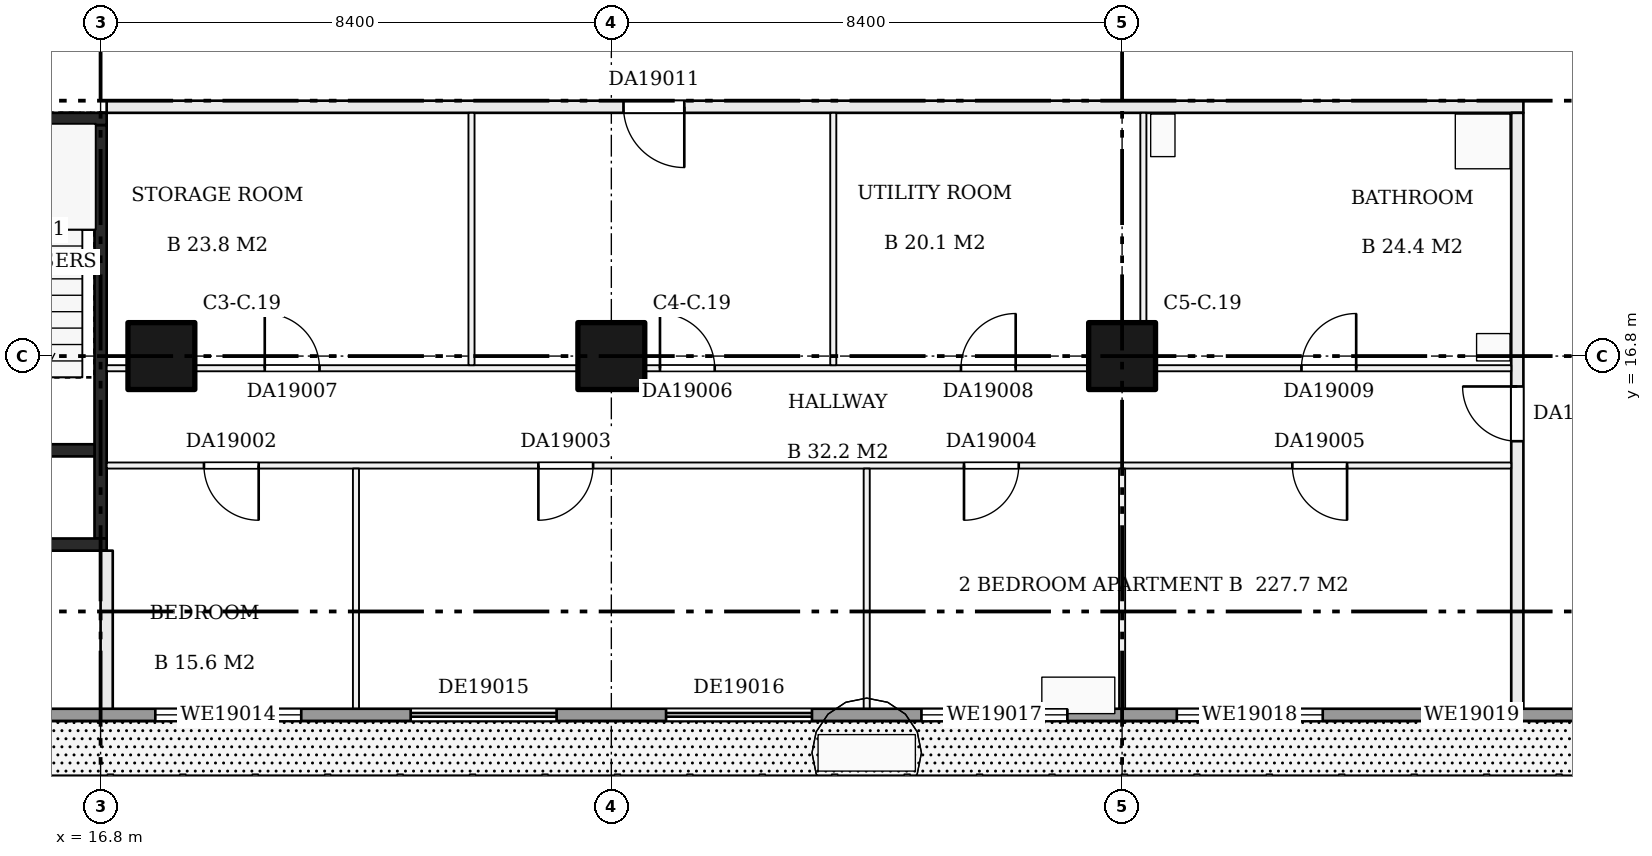
"""IFC4 building model, lengths in metres.
Left out: names, types, materials, properties, quantities, classifications, styles, units other than length and angle.
Written with IfcOpenShell. Run it as: python <this file> out.ifc"""

import sys

from ifc_helpers import new_model, si_unit, direction, frame, frame_2d, origin, origin_2d, place, context, subcontext, project, spatial, rectangle, extrude, element, fill, save


model = new_model("IFC4")
c1 = context("Model", 3, precision=1e-05, world=origin(), true_north=direction((0.0, 1.0)))
c2 = subcontext(c1, "Body", "Model", "MODEL_VIEW")
j1 = project(units=[si_unit("LENGTHUNIT", "METRE"), si_unit("PLANEANGLEUNIT", "RADIAN")], contexts=[c1])
p1 = place(None, origin())
s1 = spatial("IfcSite", under=j1, at=p1, CompositionType="ELEMENT")
p2 = place(p1, origin())
s2 = spatial("IfcBuilding", under=s1, at=p2, CompositionType="ELEMENT")
p3 = place(p2, frame((0.0, 0.0, 81.2)))
s3 = spatial("IfcBuildingStorey", under=s2, at=p3, CompositionType="ELEMENT", Elevation=81.2)
for number, where, z_axis, x_axis in (
    (1, (17.8, 16.8, 0.0), (0.0, 0.0, 1.0), (1.0, 0.0, 0.0)),
    (2, (25.2, 16.8, 0.0), (0.0, 0.0, 1.0), (1.0, 0.0, 0.0)),
    (3, (33.6, 16.8, 0.0), (0.0, 0.0, 1.0), (1.0, 0.0, 0.0)),
):
    element("IfcColumn", number, at=place(p3, frame(where, z_axis=z_axis, x_axis=x_axis)), inside=s3, PredefinedType="COLUMN", context=c2, shape_type="SweptSolid", body=[
        extrude(rectangle(XDim=1.1, YDim=1.1, at=origin_2d()), origin(), (0.0, 0.0, 1.0), 3.22),
    ])
p4 = place(p3, frame((16.8, 13.8, 0.0), z_axis=(0.0, 0.0, 1.0), x_axis=(0.0, 1.0, 0.0)))
e4 = element("IfcWall", 4, at=p4, inside=s3, PredefinedType="SHEAR", context=c2, shape_type="SweptSolid", body=[
    extrude(rectangle(XDim=6.8, YDim=0.2, at=frame_2d((3.4, 0.0))), origin(), (0.0, 0.0, 1.0), 3.22),
])
for number, where, z_axis, x_axis in (
    (5, (13.5, 13.7, 0.0), (0.0, 0.0, 1.0), (1.0, 0.0, 0.0)),
    (6, (13.5, 20.7, 0.0), (0.0, 0.0, 1.0), (1.0, 0.0, 0.0)),
):
    element("IfcWall", number, at=place(p3, frame(where, z_axis=z_axis, x_axis=x_axis)), inside=s3, PredefinedType="SHEAR", context=c2, shape_type="SweptSolid", body=[
        extrude(rectangle(XDim=3.4, YDim=0.2, at=frame_2d((1.7, 0.0))), origin(), (0.0, 0.0, 1.0), 3.22),
    ])
p5 = place(p3, frame((13.7, 15.25, 0.0), z_axis=(0.0, 0.0, 1.0), x_axis=(1.0, 0.0, 0.0)))
e7 = element("IfcWall", 7, at=p5, inside=s3, PredefinedType="SHEAR", context=c2, shape_type="SweptSolid", body=[
    extrude(rectangle(XDim=3.0, YDim=0.2, at=frame_2d((1.5, 0.0))), origin(), (0.0, 0.0, 1.0), 3.22),
])
p6 = place(p5, frame((1.0, 0.0, 0.0)))
e8 = element("IfcOpeningElement", 8, at=p6, cuts=e7, PredefinedType="OPENING", context=c2, shape_type="SweptSolid", body=[
    extrude(rectangle(XDim=1.0, YDim=2.1, at=frame_2d((0.5, 1.05))), frame((0.0, 0.11, 0.0), z_axis=(0.0, -1.0, 0.0), x_axis=(1.0, 0.0, 0.0)), (0.0, 0.0, 1.0), 0.22),
])
p7 = place(p3, frame((16.9, 15.0, 0.0), z_axis=(0.0, 0.0, 1.0), x_axis=(1.0, 0.0, 0.0)))
e9 = element("IfcWall", 9, at=p7, inside=s3, PredefinedType="PARTITIONING", context=c2, shape_type="SweptSolid", body=[
    extrude(rectangle(XDim=23.1, YDim=0.1, at=frame_2d((11.55, 0.0))), origin(), (0.0, 0.0, 1.0), 3.22),
])
p8 = place(p7, frame((1.6, 0.0, 0.0)))
e10 = element("IfcOpeningElement", 10, at=p8, cuts=e9, PredefinedType="OPENING", context=c2, shape_type="SweptSolid", body=[
    extrude(rectangle(XDim=0.9, YDim=2.1, at=frame_2d((0.45, 1.05))), frame((0.0, 0.06, 0.0), z_axis=(0.0, -1.0, 0.0), x_axis=(1.0, 0.0, 0.0)), (0.0, 0.0, 1.0), 0.12),
])
p9 = place(p7, frame((7.1, 0.0, 0.0)))
e11 = element("IfcOpeningElement", 11, at=p9, cuts=e9, PredefinedType="OPENING", context=c2, shape_type="SweptSolid", body=[
    extrude(rectangle(XDim=0.9, YDim=2.1, at=frame_2d((0.45, 1.05))), frame((0.0, 0.06, 0.0), z_axis=(0.0, -1.0, 0.0), x_axis=(1.0, 0.0, 0.0)), (0.0, 0.0, 1.0), 0.12),
])
p10 = place(p7, frame((14.1, 0.0, 0.0)))
e12 = element("IfcOpeningElement", 12, at=p10, cuts=e9, PredefinedType="OPENING", context=c2, shape_type="SweptSolid", body=[
    extrude(rectangle(XDim=0.9, YDim=2.1, at=frame_2d((0.45, 1.05))), frame((0.0, 0.06, 0.0), z_axis=(0.0, -1.0, 0.0), x_axis=(1.0, 0.0, 0.0)), (0.0, 0.0, 1.0), 0.12),
])
p11 = place(p7, frame((19.5, 0.0, 0.0)))
e13 = element("IfcOpeningElement", 13, at=p11, cuts=e9, PredefinedType="OPENING", context=c2, shape_type="SweptSolid", body=[
    extrude(rectangle(XDim=0.9, YDim=2.1, at=frame_2d((0.45, 1.05))), frame((0.0, 0.06, 0.0), z_axis=(0.0, -1.0, 0.0), x_axis=(1.0, 0.0, 0.0)), (0.0, 0.0, 1.0), 0.12),
])
p12 = place(p3, frame((16.9, 16.6, 0.0), z_axis=(0.0, 0.0, 1.0), x_axis=(1.0, 0.0, 0.0)))
e14 = element("IfcWall", 14, at=p12, inside=s3, PredefinedType="PARTITIONING", context=c2, shape_type="SweptSolid", body=[
    extrude(rectangle(XDim=23.1, YDim=0.1, at=frame_2d((11.55, 0.0))), origin(), (0.0, 0.0, 1.0), 3.22),
])
p13 = place(p12, frame((9.1, 0.0, 0.0)))
e15 = element("IfcOpeningElement", 15, at=p13, cuts=e14, PredefinedType="OPENING", context=c2, shape_type="SweptSolid", body=[
    extrude(rectangle(XDim=0.9, YDim=2.1, at=frame_2d((0.45, 1.05))), frame((0.0, 0.06, 0.0), z_axis=(0.0, -1.0, 0.0), x_axis=(1.0, 0.0, 0.0)), (0.0, 0.0, 1.0), 0.12),
])
p14 = place(p12, frame((2.6, 0.0, 0.0)))
e16 = element("IfcOpeningElement", 16, at=p14, cuts=e14, PredefinedType="OPENING", context=c2, shape_type="SweptSolid", body=[
    extrude(rectangle(XDim=0.9, YDim=2.1, at=frame_2d((0.45, 1.05))), frame((0.0, 0.06, 0.0), z_axis=(0.0, -1.0, 0.0), x_axis=(1.0, 0.0, 0.0)), (0.0, 0.0, 1.0), 0.12),
])
p15 = place(p12, frame((14.05, 0.0, 0.0)))
e17 = element("IfcOpeningElement", 17, at=p15, cuts=e14, PredefinedType="OPENING", context=c2, shape_type="SweptSolid", body=[
    extrude(rectangle(XDim=0.9, YDim=2.1, at=frame_2d((0.45, 1.05))), frame((0.0, 0.06, 0.0), z_axis=(0.0, -1.0, 0.0), x_axis=(1.0, 0.0, 0.0)), (0.0, 0.0, 1.0), 0.12),
])
p16 = place(p12, frame((19.65, 0.0, 0.0)))
e18 = element("IfcOpeningElement", 18, at=p16, cuts=e14, PredefinedType="OPENING", context=c2, shape_type="SweptSolid", body=[
    extrude(rectangle(XDim=0.9, YDim=2.1, at=frame_2d((0.45, 1.05))), frame((0.0, 0.06, 0.0), z_axis=(0.0, -1.0, 0.0), x_axis=(1.0, 0.0, 0.0)), (0.0, 0.0, 1.0), 0.12),
])
p17 = place(p3, frame((16.9, 20.9, 0.0), z_axis=(0.0, 0.0, 1.0), x_axis=(1.0, 0.0, 0.0)))
e19 = element("IfcWall", 19, at=p17, inside=s3, PredefinedType="PARTITIONING", context=c2, shape_type="SweptSolid", body=[
    extrude(rectangle(XDim=23.3, YDim=0.2, at=frame_2d((11.65, 0.0))), origin(), (0.0, 0.0, 1.0), 3.22),
])
p18 = place(p17, frame((8.5, 0.0, 0.0)))
e20 = element("IfcOpeningElement", 20, at=p18, cuts=e19, PredefinedType="OPENING", context=c2, shape_type="SweptSolid", body=[
    extrude(rectangle(XDim=1.0, YDim=2.1, at=frame_2d((0.5, 1.05))), frame((0.0, 0.11, 0.0), z_axis=(0.0, -1.0, 0.0), x_axis=(1.0, 0.0, 0.0)), (0.0, 0.0, 1.0), 0.22),
])
p19 = place(p3, frame((16.9, 10.9, 0.0), z_axis=(0.0, 0.0, 1.0), x_axis=(0.0, 1.0, 0.0)))
e21 = element("IfcWall", 21, at=p19, inside=s3, PredefinedType="PARTITIONING", context=c2, shape_type="SweptSolid", body=[
    extrude(rectangle(XDim=2.7, YDim=0.2, at=frame_2d((1.35, 0.0))), origin(), (0.0, 0.0, 1.0), 3.22),
])
p20 = place(p3, frame((21.0, 10.9, 0.0), z_axis=(0.0, 0.0, 1.0), x_axis=(0.0, 1.0, 0.0)))
e22 = element("IfcWall", 22, at=p20, inside=s3, PredefinedType="PARTITIONING", context=c2, shape_type="SweptSolid", body=[
    extrude(rectangle(XDim=4.05, YDim=0.1, at=frame_2d((2.025, 0.0))), origin(), (0.0, 0.0, 1.0), 3.22),
])
for number, where, z_axis, x_axis in (
    (23, (22.9, 16.65, 0.0), (0.0, 0.0, 1.0), (0.0, 1.0, 0.0)),
    (24, (28.85, 16.65, 0.0), (0.0, 0.0, 1.0), (0.0, 1.0, 0.0)),
):
    element("IfcWall", number, at=place(p3, frame(where, z_axis=z_axis, x_axis=x_axis)), inside=s3, PredefinedType="PARTITIONING", context=c2, shape_type="SweptSolid", body=[
        extrude(rectangle(XDim=4.15, YDim=0.1, at=frame_2d((2.075, 0.0))), origin(), (0.0, 0.0, 1.0), 3.22),
    ])
for number, where, z_axis, x_axis in (
    (25, (29.4, 10.9, 0.0), (0.0, 0.0, 1.0), (0.0, 1.0, 0.0)),
    (26, (33.6, 10.9, 0.0), (0.0, 0.0, 1.0), (0.0, 1.0, 0.0)),
):
    element("IfcWall", number, at=place(p3, frame(where, z_axis=z_axis, x_axis=x_axis)), inside=s3, PredefinedType="PARTITIONING", context=c2, shape_type="SweptSolid", body=[
        extrude(rectangle(XDim=4.05, YDim=0.1, at=frame_2d((2.025, 0.0))), origin(), (0.0, 0.0, 1.0), 3.22),
    ])
p21 = place(p3, frame((33.95, 16.65, 0.0), z_axis=(0.0, 0.0, 1.0), x_axis=(0.0, 1.0, 0.0)))
e27 = element("IfcWall", 27, at=p21, inside=s3, PredefinedType="PARTITIONING", context=c2, shape_type="SweptSolid", body=[
    extrude(rectangle(XDim=4.15, YDim=0.1, at=frame_2d((2.075, 0.0))), origin(), (0.0, 0.0, 1.0), 3.22),
])
p22 = place(p3, frame((40.1, 10.9, 0.0), z_axis=(0.0, 0.0, 1.0), x_axis=(0.0, 1.0, 0.0)))
e28 = element("IfcWall", 28, at=p22, inside=s3, PredefinedType="PARTITIONING", context=c2, shape_type="SweptSolid", body=[
    extrude(rectangle(XDim=9.9, YDim=0.2, at=frame_2d((4.95, 0.0))), origin(), (0.0, 0.0, 1.0), 3.22),
])
p23 = place(p22, frame((4.5, 0.0, 0.0)))
e29 = element("IfcOpeningElement", 29, at=p23, cuts=e28, PredefinedType="OPENING", context=c2, shape_type="SweptSolid", body=[
    extrude(rectangle(XDim=0.9, YDim=2.1, at=frame_2d((0.45, 1.05))), frame((0.0, 0.11, 0.0), z_axis=(0.0, -1.0, 0.0), x_axis=(1.0, 0.0, 0.0)), (0.0, 0.0, 1.0), 0.22),
])
p24 = place(p3, frame((4.8, 10.9, 0.0), z_axis=(0.0, 0.0, 1.0), x_axis=(1.0, 0.0, 0.0)))
e30 = element("IfcWall", 30, at=p24, inside=s3, PredefinedType="SOLIDWALL", context=c2, shape_type="SweptSolid", body=[
    extrude(rectangle(XDim=37.2, YDim=0.2, at=frame_2d((18.6, 0.0))), origin(), (0.0, 0.0, 1.0), 3.22),
])
p25 = place(p24, frame((0.3, 0.0, 0.9)))
e31 = element("IfcOpeningElement", 31, at=p25, cuts=e30, PredefinedType="OPENING", context=c2, shape_type="SweptSolid", body=[
    extrude(rectangle(XDim=2.4, YDim=1.5, at=frame_2d((1.2, 0.75))), frame((0.0, 0.11, 0.0), z_axis=(0.0, -1.0, 0.0), x_axis=(1.0, 0.0, 0.0)), (0.0, 0.0, 1.0), 0.22),
])
p26 = place(p24, frame((4.2, 0.0, 0.9)))
e32 = element("IfcOpeningElement", 32, at=p26, cuts=e30, PredefinedType="OPENING", context=c2, shape_type="SweptSolid", body=[
    extrude(rectangle(XDim=2.4, YDim=1.5, at=frame_2d((1.2, 0.75))), frame((0.0, 0.11, 0.0), z_axis=(0.0, -1.0, 0.0), x_axis=(1.0, 0.0, 0.0)), (0.0, 0.0, 1.0), 0.22),
])
p27 = place(p24, frame((12.9, 0.0, 0.9)))
e33 = element("IfcOpeningElement", 33, at=p27, cuts=e30, PredefinedType="OPENING", context=c2, shape_type="SweptSolid", body=[
    extrude(rectangle(XDim=2.4, YDim=1.5, at=frame_2d((1.2, 0.75))), frame((0.0, 0.11, 0.0), z_axis=(0.0, -1.0, 0.0), x_axis=(1.0, 0.0, 0.0)), (0.0, 0.0, 1.0), 0.22),
])
p28 = place(p24, frame((17.1, 0.0, 0.0)))
e34 = element("IfcOpeningElement", 34, at=p28, cuts=e30, PredefinedType="OPENING", context=c2, shape_type="SweptSolid", body=[
    extrude(rectangle(XDim=2.4, YDim=2.2, at=frame_2d((1.2, 1.1))), frame((0.0, 0.11, 0.0), z_axis=(0.0, -1.0, 0.0), x_axis=(1.0, 0.0, 0.0)), (0.0, 0.0, 1.0), 0.22),
])
p29 = place(p24, frame((21.3, 0.0, 0.0)))
e35 = element("IfcOpeningElement", 35, at=p29, cuts=e30, PredefinedType="OPENING", context=c2, shape_type="SweptSolid", body=[
    extrude(rectangle(XDim=2.4, YDim=2.2, at=frame_2d((1.2, 1.1))), frame((0.0, 0.11, 0.0), z_axis=(0.0, -1.0, 0.0), x_axis=(1.0, 0.0, 0.0)), (0.0, 0.0, 1.0), 0.22),
])
p30 = place(p24, frame((25.5, 0.0, 0.9)))
e36 = element("IfcOpeningElement", 36, at=p30, cuts=e30, PredefinedType="OPENING", context=c2, shape_type="SweptSolid", body=[
    extrude(rectangle(XDim=2.4, YDim=1.5, at=frame_2d((1.2, 0.75))), frame((0.0, 0.11, 0.0), z_axis=(0.0, -1.0, 0.0), x_axis=(1.0, 0.0, 0.0)), (0.0, 0.0, 1.0), 0.22),
])
p31 = place(p24, frame((29.7, 0.0, 0.9)))
e37 = element("IfcOpeningElement", 37, at=p31, cuts=e30, PredefinedType="OPENING", context=c2, shape_type="SweptSolid", body=[
    extrude(rectangle(XDim=2.4, YDim=1.5, at=frame_2d((1.2, 0.75))), frame((0.0, 0.11, 0.0), z_axis=(0.0, -1.0, 0.0), x_axis=(1.0, 0.0, 0.0)), (0.0, 0.0, 1.0), 0.22),
])
p32 = place(p24, frame((33.9, 0.0, 0.9)))
e38 = element("IfcOpeningElement", 38, at=p32, cuts=e30, PredefinedType="OPENING", context=c2, shape_type="SweptSolid", body=[
    extrude(rectangle(XDim=1.3, YDim=1.5, at=frame_2d((0.65, 0.75))), frame((0.0, 0.11, 0.0), z_axis=(0.0, -1.0, 0.0), x_axis=(1.0, 0.0, 0.0)), (0.0, 0.0, 1.0), 0.22),
])
p33 = place(p8, frame((0.9, 0.0, 0.0), z_axis=(0.0, 0.0, 1.0), x_axis=(-1.0, 0.0, 0.0)))
e39 = element("IfcDoor", 39, at=p33, inside=s3, OperationType="SINGLE_SWING_LEFT", PredefinedType="DOOR", context=c2, shape_type="SweptSolid", body=[
    extrude(rectangle(XDim=0.9, YDim=2.1, at=frame_2d((0.45, 1.05))), frame((0.0, 0.025, 0.0), z_axis=(0.0, -1.0, 0.0), x_axis=(1.0, 0.0, 0.0)), (0.0, 0.0, 1.0), 0.05),
])
fill(e10, e39)
p34 = place(p9, frame((0.9, 0.0, 0.0), z_axis=(0.0, 0.0, 1.0), x_axis=(-1.0, 0.0, 0.0)))
e40 = element("IfcDoor", 40, at=p34, inside=s3, OperationType="SINGLE_SWING_RIGHT", PredefinedType="DOOR", context=c2, shape_type="SweptSolid", body=[
    extrude(rectangle(XDim=0.9, YDim=2.1, at=frame_2d((0.45, 1.05))), frame((0.0, 0.025, 0.0), z_axis=(0.0, -1.0, 0.0), x_axis=(1.0, 0.0, 0.0)), (0.0, 0.0, 1.0), 0.05),
])
fill(e11, e40)
p35 = place(p10, frame((0.9, 0.0, 0.0), z_axis=(0.0, 0.0, 1.0), x_axis=(-1.0, 0.0, 0.0)))
e41 = element("IfcDoor", 41, at=p35, inside=s3, OperationType="SINGLE_SWING_RIGHT", PredefinedType="DOOR", context=c2, shape_type="SweptSolid", body=[
    extrude(rectangle(XDim=0.9, YDim=2.1, at=frame_2d((0.45, 1.05))), frame((0.0, 0.025, 0.0), z_axis=(0.0, -1.0, 0.0), x_axis=(1.0, 0.0, 0.0)), (0.0, 0.0, 1.0), 0.05),
])
fill(e12, e41)
p36 = place(p11, frame((0.9, 0.0, 0.0), z_axis=(0.0, 0.0, 1.0), x_axis=(-1.0, 0.0, 0.0)))
e42 = element("IfcDoor", 42, at=p36, inside=s3, OperationType="SINGLE_SWING_LEFT", PredefinedType="DOOR", context=c2, shape_type="SweptSolid", body=[
    extrude(rectangle(XDim=0.9, YDim=2.1, at=frame_2d((0.45, 1.05))), frame((0.0, 0.025, 0.0), z_axis=(0.0, -1.0, 0.0), x_axis=(1.0, 0.0, 0.0)), (0.0, 0.0, 1.0), 0.05),
])
fill(e13, e42)
p37 = place(p13, origin())
e43 = element("IfcDoor", 43, at=p37, inside=s3, OperationType="SINGLE_SWING_LEFT", PredefinedType="DOOR", context=c2, shape_type="SweptSolid", body=[
    extrude(rectangle(XDim=0.9, YDim=2.1, at=frame_2d((0.45, 1.05))), frame((0.0, 0.025, 0.0), z_axis=(0.0, -1.0, 0.0), x_axis=(1.0, 0.0, 0.0)), (0.0, 0.0, 1.0), 0.05),
])
fill(e15, e43)
p38 = place(p14, origin())
e44 = element("IfcDoor", 44, at=p38, inside=s3, OperationType="SINGLE_SWING_LEFT", PredefinedType="DOOR", context=c2, shape_type="SweptSolid", body=[
    extrude(rectangle(XDim=0.9, YDim=2.1, at=frame_2d((0.45, 1.05))), frame((0.0, 0.025, 0.0), z_axis=(0.0, -1.0, 0.0), x_axis=(1.0, 0.0, 0.0)), (0.0, 0.0, 1.0), 0.05),
])
fill(e16, e44)
p39 = place(p15, origin())
e45 = element("IfcDoor", 45, at=p39, inside=s3, OperationType="SINGLE_SWING_RIGHT", PredefinedType="DOOR", context=c2, shape_type="SweptSolid", body=[
    extrude(rectangle(XDim=0.9, YDim=2.1, at=frame_2d((0.45, 1.05))), frame((0.0, 0.025, 0.0), z_axis=(0.0, -1.0, 0.0), x_axis=(1.0, 0.0, 0.0)), (0.0, 0.0, 1.0), 0.05),
])
fill(e17, e45)
p40 = place(p16, origin())
e46 = element("IfcDoor", 46, at=p40, inside=s3, OperationType="SINGLE_SWING_RIGHT", PredefinedType="DOOR", context=c2, shape_type="SweptSolid", body=[
    extrude(rectangle(XDim=0.9, YDim=2.1, at=frame_2d((0.45, 1.05))), frame((0.0, 0.025, 0.0), z_axis=(0.0, -1.0, 0.0), x_axis=(1.0, 0.0, 0.0)), (0.0, 0.0, 1.0), 0.05),
])
fill(e18, e46)
p41 = place(p18, frame((1.0, 0.0, 0.0), z_axis=(0.0, 0.0, 1.0), x_axis=(-1.0, 0.0, 0.0)))
e47 = element("IfcDoor", 47, at=p41, inside=s3, OperationType="SINGLE_SWING_LEFT", PredefinedType="DOOR", context=c2, shape_type="SweptSolid", body=[
    extrude(rectangle(XDim=1.0, YDim=2.1, at=frame_2d((0.5, 1.05))), frame((0.0, 0.025, 0.0), z_axis=(0.0, -1.0, 0.0), x_axis=(1.0, 0.0, 0.0)), (0.0, 0.0, 1.0), 0.05),
])
fill(e20, e47)
p42 = place(p23, origin())
e48 = element("IfcDoor", 48, at=p42, inside=s3, OperationType="SINGLE_SWING_RIGHT", PredefinedType="DOOR", context=c2, shape_type="SweptSolid", body=[
    extrude(rectangle(XDim=0.9, YDim=2.1, at=frame_2d((0.45, 1.05))), frame((0.0, 0.025, 0.0), z_axis=(0.0, -1.0, 0.0), x_axis=(1.0, 0.0, 0.0)), (0.0, 0.0, 1.0), 0.05),
])
fill(e29, e48)
p43 = place(p27, origin())
e49 = element("IfcWindow", 49, at=p43, inside=s3, PartitioningType="SINGLE_PANEL", PredefinedType="WINDOW", context=c2, shape_type="SweptSolid", body=[
    extrude(rectangle(XDim=2.4, YDim=1.5, at=frame_2d((1.2, 0.75))), frame((0.0, 0.03, 0.0), z_axis=(0.0, -1.0, 0.0), x_axis=(1.0, 0.0, 0.0)), (0.0, 0.0, 1.0), 0.06),
])
fill(e33, e49)
p44 = place(p28, origin())
e50 = element("IfcDoor", 50, at=p44, inside=s3, OperationType="DOUBLE_DOOR_SLIDING", PredefinedType="DOOR", context=c2, shape_type="SweptSolid", body=[
    extrude(rectangle(XDim=2.4, YDim=2.2, at=frame_2d((1.2, 1.1))), frame((0.0, 0.025, 0.0), z_axis=(0.0, -1.0, 0.0), x_axis=(1.0, 0.0, 0.0)), (0.0, 0.0, 1.0), 0.05),
])
fill(e34, e50)
p45 = place(p29, origin())
e51 = element("IfcDoor", 51, at=p45, inside=s3, OperationType="DOUBLE_DOOR_SLIDING", PredefinedType="DOOR", context=c2, shape_type="SweptSolid", body=[
    extrude(rectangle(XDim=2.4, YDim=2.2, at=frame_2d((1.2, 1.1))), frame((0.0, 0.025, 0.0), z_axis=(0.0, -1.0, 0.0), x_axis=(1.0, 0.0, 0.0)), (0.0, 0.0, 1.0), 0.05),
])
fill(e35, e51)
p46 = place(p30, origin())
e52 = element("IfcWindow", 52, at=p46, inside=s3, PartitioningType="SINGLE_PANEL", PredefinedType="WINDOW", context=c2, shape_type="SweptSolid", body=[
    extrude(rectangle(XDim=2.4, YDim=1.5, at=frame_2d((1.2, 0.75))), frame((0.0, 0.03, 0.0), z_axis=(0.0, -1.0, 0.0), x_axis=(1.0, 0.0, 0.0)), (0.0, 0.0, 1.0), 0.06),
])
fill(e36, e52)
p47 = place(p31, origin())
e53 = element("IfcWindow", 53, at=p47, inside=s3, PartitioningType="SINGLE_PANEL", PredefinedType="WINDOW", context=c2, shape_type="SweptSolid", body=[
    extrude(rectangle(XDim=2.4, YDim=1.5, at=frame_2d((1.2, 0.75))), frame((0.0, 0.03, 0.0), z_axis=(0.0, -1.0, 0.0), x_axis=(1.0, 0.0, 0.0)), (0.0, 0.0, 1.0), 0.06),
])
fill(e37, e53)
p48 = place(p32, origin())
e54 = element("IfcWindow", 54, at=p48, inside=s3, PartitioningType="SINGLE_PANEL", PredefinedType="WINDOW", context=c2, shape_type="SweptSolid", body=[
    extrude(rectangle(XDim=1.3, YDim=1.5, at=frame_2d((0.65, 0.75))), frame((0.0, 0.03, 0.0), z_axis=(0.0, -1.0, 0.0), x_axis=(1.0, 0.0, 0.0)), (0.0, 0.0, 1.0), 0.06),
])
fill(e38, e54)
save(model, sys.argv[1])
